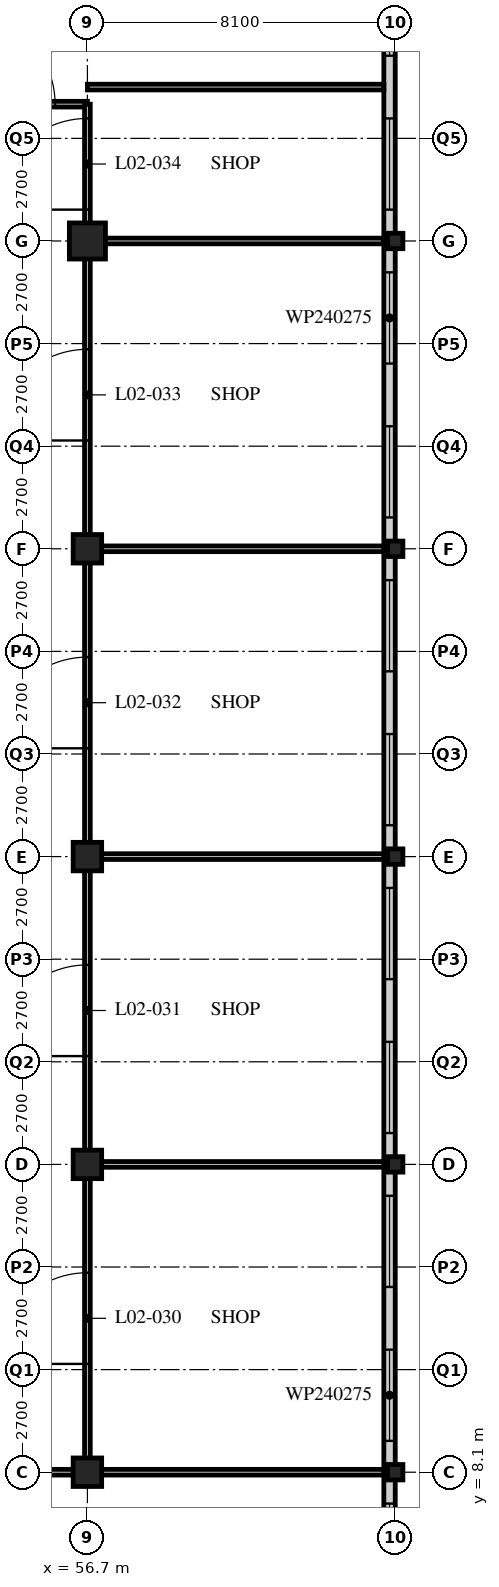
"""IFC4 building model, lengths in metres.
Left out: names, types, materials, properties, quantities, classifications, styles, units other than length and angle.
Written with IfcOpenShell. Run it as: python <this file> out.ifc"""

import sys

from ifc_helpers import new_model, si_unit, direction, frame, frame_2d, origin, origin_2d, place, context, subcontext, project, spatial, rectangle, hollow_rectangle, i_section, extrude, element, fill, save


model = new_model("IFC4")
c1 = context("Model", 3, precision=1e-05, world=origin(), true_north=direction((0.0, 1.0)))
c2 = subcontext(c1, "Body", "Model", "MODEL_VIEW")
j1 = project(units=[si_unit("LENGTHUNIT", "METRE"), si_unit("PLANEANGLEUNIT", "RADIAN")], contexts=[c1])
p1 = place(None, origin())
s1 = spatial("IfcSite", under=j1, at=p1, CompositionType="ELEMENT")
p2 = place(p1, origin())
s2 = spatial("IfcBuilding", under=s1, at=p2, CompositionType="ELEMENT")
p3 = place(p2, frame((0.0, 0.0, 11.4)))
s3 = spatial("IfcBuildingStorey", under=s2, at=p3, CompositionType="ELEMENT", Elevation=11.4)
for number, where, z_axis, x_axis in (
    (1, (56.7, 8.1, 0.0), (0.0, 0.0, 1.0), (1.0, 0.0, 0.0)),
    (2, (56.7, 16.2, 0.0), (0.0, 0.0, 1.0), (1.0, 0.0, 0.0)),
    (3, (56.7, 24.3, 0.0), (0.0, 0.0, 1.0), (1.0, 0.0, 0.0)),
    (4, (56.7, 32.4, 0.0), (0.0, 0.0, 1.0), (1.0, 0.0, 0.0)),
):
    element("IfcColumn", number, at=place(p3, frame(where, z_axis=z_axis, x_axis=x_axis)), inside=s3, PredefinedType="COLUMN", context=c2, shape_type="SweptSolid", body=[
        extrude(hollow_rectangle(XDim=0.75, YDim=0.75, WallThickness=0.07, at=origin_2d()), origin(), (0.0, 0.0, 1.0), 5.4),
    ])
p4 = place(p3, frame((56.7, 40.5, 0.0), z_axis=(0.0, 0.0, 1.0), x_axis=(1.0, 0.0, 0.0)))
e5 = element("IfcColumn", 5, at=p4, inside=s3, PredefinedType="COLUMN", context=c2, shape_type="SweptSolid", body=[
    extrude(hollow_rectangle(XDim=0.95, YDim=0.95, WallThickness=0.1, at=origin_2d()), origin(), (0.0, 0.0, 1.0), 5.4),
])
for number, where, z_axis, x_axis in (
    (6, (64.8, 8.1, 0.0), (0.0, 0.0, 1.0), (1.0, 0.0, 0.0)),
    (7, (64.8, 16.2, 0.0), (0.0, 0.0, 1.0), (1.0, 0.0, 0.0)),
    (8, (64.8, 24.3, 0.0), (0.0, 0.0, 1.0), (1.0, 0.0, 0.0)),
    (9, (64.8, 32.4, 0.0), (0.0, 0.0, 1.0), (1.0, 0.0, 0.0)),
    (10, (64.8, 40.5, 0.0), (0.0, 0.0, 1.0), (1.0, 0.0, 0.0)),
):
    element("IfcColumn", number, at=place(p3, frame(where, z_axis=z_axis, x_axis=x_axis)), inside=s3, PredefinedType="COLUMN", context=c2, shape_type="SweptSolid", body=[
        extrude(i_section(OverallWidth=0.403, OverallDepth=0.406, WebThickness=0.027, FlangeThickness=0.043, FilletRadius=0.015, at=origin_2d()), origin(), (0.0, 0.0, 1.0), 5.4),
    ])
p5 = place(p3, frame((64.65, 0.24, 0.0), z_axis=(0.0, 0.0, 1.0), x_axis=(0.0, 1.0, 0.0)))
e11 = element("IfcWall", 11, at=p5, inside=s3, PredefinedType="SOLIDWALL", context=c2, shape_type="SweptSolid", body=[
    extrude(rectangle(XDim=48.36, YDim=0.3, at=frame_2d((24.18, 0.0))), origin(), (0.0, 0.0, 1.0), 5.15),
])
p6 = place(p5, frame((0.585, 0.0, 1.0)))
e12 = element("IfcOpeningElement", 12, at=p6, cuts=e11, PredefinedType="OPENING", context=c2, shape_type="SweptSolid", body=[
    extrude(rectangle(XDim=2.4, YDim=2.75, at=frame_2d((1.2, 1.375))), frame((0.0, 0.16, 0.0), z_axis=(0.0, -1.0, 0.0), x_axis=(1.0, 0.0, 0.0)), (0.0, 0.0, 1.0), 0.32),
])
p7 = place(p5, frame((4.635, 0.0, 1.0)))
e13 = element("IfcOpeningElement", 13, at=p7, cuts=e11, PredefinedType="OPENING", context=c2, shape_type="SweptSolid", body=[
    extrude(rectangle(XDim=2.4, YDim=2.75, at=frame_2d((1.2, 1.375))), frame((0.0, 0.16, 0.0), z_axis=(0.0, -1.0, 0.0), x_axis=(1.0, 0.0, 0.0)), (0.0, 0.0, 1.0), 0.32),
])
p8 = place(p5, frame((8.685, 0.0, 1.0)))
e14 = element("IfcOpeningElement", 14, at=p8, cuts=e11, PredefinedType="OPENING", context=c2, shape_type="SweptSolid", body=[
    extrude(rectangle(XDim=2.4, YDim=2.75, at=frame_2d((1.2, 1.375))), frame((0.0, 0.16, 0.0), z_axis=(0.0, -1.0, 0.0), x_axis=(1.0, 0.0, 0.0)), (0.0, 0.0, 1.0), 0.32),
])
p9 = place(p5, frame((12.735, 0.0, 1.0)))
e15 = element("IfcOpeningElement", 15, at=p9, cuts=e11, PredefinedType="OPENING", context=c2, shape_type="SweptSolid", body=[
    extrude(rectangle(XDim=2.4, YDim=2.75, at=frame_2d((1.2, 1.375))), frame((0.0, 0.16, 0.0), z_axis=(0.0, -1.0, 0.0), x_axis=(1.0, 0.0, 0.0)), (0.0, 0.0, 1.0), 0.32),
])
p10 = place(p5, frame((16.785, 0.0, 1.0)))
e16 = element("IfcOpeningElement", 16, at=p10, cuts=e11, PredefinedType="OPENING", context=c2, shape_type="SweptSolid", body=[
    extrude(rectangle(XDim=2.4, YDim=2.75, at=frame_2d((1.2, 1.375))), frame((0.0, 0.16, 0.0), z_axis=(0.0, -1.0, 0.0), x_axis=(1.0, 0.0, 0.0)), (0.0, 0.0, 1.0), 0.32),
])
p11 = place(p5, frame((20.835, 0.0, 1.0)))
e17 = element("IfcOpeningElement", 17, at=p11, cuts=e11, PredefinedType="OPENING", context=c2, shape_type="SweptSolid", body=[
    extrude(rectangle(XDim=2.4, YDim=2.75, at=frame_2d((1.2, 1.375))), frame((0.0, 0.16, 0.0), z_axis=(0.0, -1.0, 0.0), x_axis=(1.0, 0.0, 0.0)), (0.0, 0.0, 1.0), 0.32),
])
p12 = place(p5, frame((24.885, 0.0, 1.0)))
e18 = element("IfcOpeningElement", 18, at=p12, cuts=e11, PredefinedType="OPENING", context=c2, shape_type="SweptSolid", body=[
    extrude(rectangle(XDim=2.4, YDim=2.75, at=frame_2d((1.2, 1.375))), frame((0.0, 0.16, 0.0), z_axis=(0.0, -1.0, 0.0), x_axis=(1.0, 0.0, 0.0)), (0.0, 0.0, 1.0), 0.32),
])
p13 = place(p5, frame((28.935, 0.0, 1.0)))
e19 = element("IfcOpeningElement", 19, at=p13, cuts=e11, PredefinedType="OPENING", context=c2, shape_type="SweptSolid", body=[
    extrude(rectangle(XDim=2.4, YDim=2.75, at=frame_2d((1.2, 1.375))), frame((0.0, 0.16, 0.0), z_axis=(0.0, -1.0, 0.0), x_axis=(1.0, 0.0, 0.0)), (0.0, 0.0, 1.0), 0.32),
])
p14 = place(p5, frame((32.985, 0.0, 1.0)))
e20 = element("IfcOpeningElement", 20, at=p14, cuts=e11, PredefinedType="OPENING", context=c2, shape_type="SweptSolid", body=[
    extrude(rectangle(XDim=2.4, YDim=2.75, at=frame_2d((1.2, 1.375))), frame((0.0, 0.16, 0.0), z_axis=(0.0, -1.0, 0.0), x_axis=(1.0, 0.0, 0.0)), (0.0, 0.0, 1.0), 0.32),
])
p15 = place(p5, frame((37.035, 0.0, 1.0)))
e21 = element("IfcOpeningElement", 21, at=p15, cuts=e11, PredefinedType="OPENING", context=c2, shape_type="SweptSolid", body=[
    extrude(rectangle(XDim=2.4, YDim=2.75, at=frame_2d((1.2, 1.375))), frame((0.0, 0.16, 0.0), z_axis=(0.0, -1.0, 0.0), x_axis=(1.0, 0.0, 0.0)), (0.0, 0.0, 1.0), 0.32),
])
p16 = place(p5, frame((41.085, 0.0, 1.0)))
e22 = element("IfcOpeningElement", 22, at=p16, cuts=e11, PredefinedType="OPENING", context=c2, shape_type="SweptSolid", body=[
    extrude(rectangle(XDim=2.4, YDim=2.75, at=frame_2d((1.2, 1.375))), frame((0.0, 0.16, 0.0), z_axis=(0.0, -1.0, 0.0), x_axis=(1.0, 0.0, 0.0)), (0.0, 0.0, 1.0), 0.32),
])
p17 = place(p5, frame((45.135, 0.0, 1.0)))
e23 = element("IfcOpeningElement", 23, at=p17, cuts=e11, PredefinedType="OPENING", context=c2, shape_type="SweptSolid", body=[
    extrude(rectangle(XDim=2.4, YDim=2.75, at=frame_2d((1.2, 1.375))), frame((0.0, 0.16, 0.0), z_axis=(0.0, -1.0, 0.0), x_axis=(1.0, 0.0, 0.0)), (0.0, 0.0, 1.0), 0.32),
])
p18 = place(p3, frame((0.0, 8.1, 0.0), z_axis=(0.0, 0.0, 1.0), x_axis=(1.0, 0.0, 0.0)))
e24 = element("IfcWall", 24, at=p18, inside=s3, PredefinedType="PARTITIONING", context=c2, shape_type="SweptSolid", body=[
    extrude(rectangle(XDim=56.7, YDim=0.15, at=frame_2d((28.35, 0.0))), origin(), (0.0, 0.0, 1.0), 4.538),
])
p19 = place(p18, frame((17.05, 0.0, 0.0)))
e25 = element("IfcOpeningElement", 25, at=p19, cuts=e24, PredefinedType="OPENING", context=c2, shape_type="SweptSolid", body=[
    extrude(rectangle(XDim=1.8, YDim=2.4, at=frame_2d((0.9, 1.2))), frame((0.0, 0.085, 0.0), z_axis=(0.0, -1.0, 0.0), x_axis=(1.0, 0.0, 0.0)), (0.0, 0.0, 1.0), 0.17),
])
p20 = place(p18, frame((27.15, 0.0, 0.0)))
e26 = element("IfcOpeningElement", 26, at=p20, cuts=e24, PredefinedType="OPENING", context=c2, shape_type="SweptSolid", body=[
    extrude(rectangle(XDim=2.4, YDim=2.7, at=frame_2d((1.2, 1.35))), frame((0.0, 0.085, 0.0), z_axis=(0.0, -1.0, 0.0), x_axis=(1.0, 0.0, 0.0)), (0.0, 0.0, 1.0), 0.17),
])
p21 = place(p18, frame((35.25, 0.0, 0.0)))
e27 = element("IfcOpeningElement", 27, at=p21, cuts=e24, PredefinedType="OPENING", context=c2, shape_type="SweptSolid", body=[
    extrude(rectangle(XDim=2.4, YDim=2.7, at=frame_2d((1.2, 1.35))), frame((0.0, 0.085, 0.0), z_axis=(0.0, -1.0, 0.0), x_axis=(1.0, 0.0, 0.0)), (0.0, 0.0, 1.0), 0.17),
])
p22 = place(p18, frame((43.65, 0.0, 0.0)))
e28 = element("IfcOpeningElement", 28, at=p22, cuts=e24, PredefinedType="OPENING", context=c2, shape_type="SweptSolid", body=[
    extrude(rectangle(XDim=1.8, YDim=2.4, at=frame_2d((0.9, 1.2))), frame((0.0, 0.085, 0.0), z_axis=(0.0, -1.0, 0.0), x_axis=(1.0, 0.0, 0.0)), (0.0, 0.0, 1.0), 0.17),
])
p23 = place(p18, frame((2.85, 0.0, 0.0)))
e29 = element("IfcOpeningElement", 29, at=p23, cuts=e24, PredefinedType="OPENING", context=c2, shape_type="SweptSolid", body=[
    extrude(rectangle(XDim=2.4, YDim=2.7, at=frame_2d((1.2, 1.35))), frame((0.0, 0.085, 0.0), z_axis=(0.0, -1.0, 0.0), x_axis=(1.0, 0.0, 0.0)), (0.0, 0.0, 1.0), 0.17),
])
p24 = place(p18, frame((51.45, 0.0, 0.0)))
e30 = element("IfcOpeningElement", 30, at=p24, cuts=e24, PredefinedType="OPENING", context=c2, shape_type="SweptSolid", body=[
    extrude(rectangle(XDim=2.4, YDim=2.7, at=frame_2d((1.2, 1.35))), frame((0.0, 0.085, 0.0), z_axis=(0.0, -1.0, 0.0), x_axis=(1.0, 0.0, 0.0)), (0.0, 0.0, 1.0), 0.17),
])
p25 = place(p3, frame((0.0, 44.1, 0.0), z_axis=(0.0, 0.0, 1.0), x_axis=(1.0, 0.0, 0.0)))
e31 = element("IfcWall", 31, at=p25, inside=s3, PredefinedType="PARTITIONING", context=c2, shape_type="SweptSolid", body=[
    extrude(rectangle(XDim=56.7, YDim=0.15, at=frame_2d((28.35, 0.0))), origin(), (0.0, 0.0, 1.0), 5.15),
])
p26 = place(p25, frame((10.95, 0.0, 0.0)))
e32 = element("IfcOpeningElement", 32, at=p26, cuts=e31, PredefinedType="OPENING", context=c2, shape_type="SweptSolid", body=[
    extrude(rectangle(XDim=2.4, YDim=2.7, at=frame_2d((1.2, 1.35))), frame((0.0, 0.085, 0.0), z_axis=(0.0, -1.0, 0.0), x_axis=(1.0, 0.0, 0.0)), (0.0, 0.0, 1.0), 0.17),
])
p27 = place(p25, frame((19.05, 0.0, 0.0)))
e33 = element("IfcOpeningElement", 33, at=p27, cuts=e31, PredefinedType="OPENING", context=c2, shape_type="SweptSolid", body=[
    extrude(rectangle(XDim=2.4, YDim=2.7, at=frame_2d((1.2, 1.35))), frame((0.0, 0.085, 0.0), z_axis=(0.0, -1.0, 0.0), x_axis=(1.0, 0.0, 0.0)), (0.0, 0.0, 1.0), 0.17),
])
p28 = place(p25, frame((27.15, 0.0, 0.0)))
e34 = element("IfcOpeningElement", 34, at=p28, cuts=e31, PredefinedType="OPENING", context=c2, shape_type="SweptSolid", body=[
    extrude(rectangle(XDim=2.4, YDim=2.7, at=frame_2d((1.2, 1.35))), frame((0.0, 0.085, 0.0), z_axis=(0.0, -1.0, 0.0), x_axis=(1.0, 0.0, 0.0)), (0.0, 0.0, 1.0), 0.17),
])
p29 = place(p25, frame((35.25, 0.0, 0.0)))
e35 = element("IfcOpeningElement", 35, at=p29, cuts=e31, PredefinedType="OPENING", context=c2, shape_type="SweptSolid", body=[
    extrude(rectangle(XDim=2.4, YDim=2.7, at=frame_2d((1.2, 1.35))), frame((0.0, 0.085, 0.0), z_axis=(0.0, -1.0, 0.0), x_axis=(1.0, 0.0, 0.0)), (0.0, 0.0, 1.0), 0.17),
])
p30 = place(p25, frame((43.35, 0.0, 0.0)))
e36 = element("IfcOpeningElement", 36, at=p30, cuts=e31, PredefinedType="OPENING", context=c2, shape_type="SweptSolid", body=[
    extrude(rectangle(XDim=2.4, YDim=2.7, at=frame_2d((1.2, 1.35))), frame((0.0, 0.085, 0.0), z_axis=(0.0, -1.0, 0.0), x_axis=(1.0, 0.0, 0.0)), (0.0, 0.0, 1.0), 0.17),
])
p31 = place(p25, frame((53.45, 0.0, 0.0)))
e37 = element("IfcOpeningElement", 37, at=p31, cuts=e31, PredefinedType="OPENING", context=c2, shape_type="SweptSolid", body=[
    extrude(rectangle(XDim=2.4, YDim=2.7, at=frame_2d((1.2, 1.35))), frame((0.0, 0.085, 0.0), z_axis=(0.0, -1.0, 0.0), x_axis=(1.0, 0.0, 0.0)), (0.0, 0.0, 1.0), 0.17),
])
p32 = place(p25, frame((4.85, 0.0, 0.0)))
e38 = element("IfcOpeningElement", 38, at=p32, cuts=e31, PredefinedType="OPENING", context=c2, shape_type="SweptSolid", body=[
    extrude(rectangle(XDim=2.4, YDim=2.7, at=frame_2d((1.2, 1.35))), frame((0.0, 0.085, 0.0), z_axis=(0.0, -1.0, 0.0), x_axis=(1.0, 0.0, 0.0)), (0.0, 0.0, 1.0), 0.17),
])
p33 = place(p3, frame((56.7, 8.1, 0.0), z_axis=(0.0, 0.0, 1.0), x_axis=(0.0, 1.0, 0.0)))
e39 = element("IfcWall", 39, at=p33, inside=s3, PredefinedType="PARTITIONING", context=c2, shape_type="SweptSolid", body=[
    extrude(rectangle(XDim=36.0, YDim=0.15, at=frame_2d((18.0, 0.0))), origin(), (0.0, 0.0, 1.0), 4.538),
])
p34 = place(p33, frame((2.85, 0.0, 0.0)))
e40 = element("IfcOpeningElement", 40, at=p34, cuts=e39, PredefinedType="OPENING", context=c2, shape_type="SweptSolid", body=[
    extrude(rectangle(XDim=2.4, YDim=2.7, at=frame_2d((1.2, 1.35))), frame((0.0, 0.085, 0.0), z_axis=(0.0, -1.0, 0.0), x_axis=(1.0, 0.0, 0.0)), (0.0, 0.0, 1.0), 0.17),
])
p35 = place(p33, frame((10.95, 0.0, 0.0)))
e41 = element("IfcOpeningElement", 41, at=p35, cuts=e39, PredefinedType="OPENING", context=c2, shape_type="SweptSolid", body=[
    extrude(rectangle(XDim=2.4, YDim=2.7, at=frame_2d((1.2, 1.35))), frame((0.0, 0.085, 0.0), z_axis=(0.0, -1.0, 0.0), x_axis=(1.0, 0.0, 0.0)), (0.0, 0.0, 1.0), 0.17),
])
p36 = place(p33, frame((19.05, 0.0, 0.0)))
e42 = element("IfcOpeningElement", 42, at=p36, cuts=e39, PredefinedType="OPENING", context=c2, shape_type="SweptSolid", body=[
    extrude(rectangle(XDim=2.4, YDim=2.7, at=frame_2d((1.2, 1.35))), frame((0.0, 0.085, 0.0), z_axis=(0.0, -1.0, 0.0), x_axis=(1.0, 0.0, 0.0)), (0.0, 0.0, 1.0), 0.17),
])
p37 = place(p33, frame((27.15, 0.0, 0.0)))
e43 = element("IfcOpeningElement", 43, at=p37, cuts=e39, PredefinedType="OPENING", context=c2, shape_type="SweptSolid", body=[
    extrude(rectangle(XDim=2.4, YDim=2.7, at=frame_2d((1.2, 1.35))), frame((0.0, 0.085, 0.0), z_axis=(0.0, -1.0, 0.0), x_axis=(1.0, 0.0, 0.0)), (0.0, 0.0, 1.0), 0.17),
])
p38 = place(p33, frame((33.225, 0.0, 0.0)))
e44 = element("IfcOpeningElement", 44, at=p38, cuts=e39, PredefinedType="OPENING", context=c2, shape_type="SweptSolid", body=[
    extrude(rectangle(XDim=2.4, YDim=2.7, at=frame_2d((1.2, 1.35))), frame((0.0, 0.085, 0.0), z_axis=(0.0, -1.0, 0.0), x_axis=(1.0, 0.0, 0.0)), (0.0, 0.0, 1.0), 0.17),
])
for number, where, z_axis, x_axis in (
    (45, (56.7, 16.2, 0.0), (0.0, 0.0, 1.0), (1.0, 0.0, 0.0)),
    (46, (56.7, 24.3, 0.0), (0.0, 0.0, 1.0), (1.0, 0.0, 0.0)),
    (47, (56.7, 32.4, 0.0), (0.0, 0.0, 1.0), (1.0, 0.0, 0.0)),
    (48, (56.7, 40.5, 0.0), (0.0, 0.0, 1.0), (1.0, 0.0, 0.0)),
    (49, (56.7, 8.1, 0.0), (0.0, 0.0, 1.0), (1.0, 0.0, 0.0)),
):
    element("IfcWall", number, at=place(p3, frame(where, z_axis=z_axis, x_axis=x_axis)), inside=s3, PredefinedType="PARTITIONING", context=c2, shape_type="SweptSolid", body=[
        extrude(rectangle(XDim=7.8, YDim=0.15, at=frame_2d((3.9, 0.0))), origin(), (0.0, 0.0, 1.0), 4.538),
    ])
p39 = place(p3, frame((56.7, 44.55, 0.0), z_axis=(0.0, 0.0, 1.0), x_axis=(1.0, 0.0, 0.0)))
e50 = element("IfcWall", 50, at=p39, inside=s3, PredefinedType="PARTITIONING", context=c2, shape_type="SweptSolid", body=[
    extrude(rectangle(XDim=7.8, YDim=0.15, at=frame_2d((3.9, 0.0))), origin(), (0.0, 0.0, 1.0), 5.15),
])
p40 = place(p7, origin())
e51 = element("IfcWindow", 51, at=p40, inside=s3, PartitioningType="SINGLE_PANEL", PredefinedType="WINDOW", context=c2, shape_type="SweptSolid", body=[
    extrude(rectangle(XDim=2.4, YDim=2.75, at=frame_2d((1.2, 1.375))), frame((0.0, 0.03, 0.0), z_axis=(0.0, -1.0, 0.0), x_axis=(1.0, 0.0, 0.0)), (0.0, 0.0, 1.0), 0.06),
])
fill(e13, e51)
p41 = place(p8, origin())
e52 = element("IfcWindow", 52, at=p41, inside=s3, PartitioningType="SINGLE_PANEL", PredefinedType="WINDOW", context=c2, shape_type="SweptSolid", body=[
    extrude(rectangle(XDim=2.4, YDim=2.75, at=frame_2d((1.2, 1.375))), frame((0.0, 0.03, 0.0), z_axis=(0.0, -1.0, 0.0), x_axis=(1.0, 0.0, 0.0)), (0.0, 0.0, 1.0), 0.06),
])
fill(e14, e52)
p42 = place(p9, origin())
e53 = element("IfcWindow", 53, at=p42, inside=s3, PartitioningType="SINGLE_PANEL", PredefinedType="WINDOW", context=c2, shape_type="SweptSolid", body=[
    extrude(rectangle(XDim=2.4, YDim=2.75, at=frame_2d((1.2, 1.375))), frame((0.0, 0.03, 0.0), z_axis=(0.0, -1.0, 0.0), x_axis=(1.0, 0.0, 0.0)), (0.0, 0.0, 1.0), 0.06),
])
fill(e15, e53)
p43 = place(p10, origin())
e54 = element("IfcWindow", 54, at=p43, inside=s3, PartitioningType="SINGLE_PANEL", PredefinedType="WINDOW", context=c2, shape_type="SweptSolid", body=[
    extrude(rectangle(XDim=2.4, YDim=2.75, at=frame_2d((1.2, 1.375))), frame((0.0, 0.03, 0.0), z_axis=(0.0, -1.0, 0.0), x_axis=(1.0, 0.0, 0.0)), (0.0, 0.0, 1.0), 0.06),
])
fill(e16, e54)
p44 = place(p11, origin())
e55 = element("IfcWindow", 55, at=p44, inside=s3, PartitioningType="SINGLE_PANEL", PredefinedType="WINDOW", context=c2, shape_type="SweptSolid", body=[
    extrude(rectangle(XDim=2.4, YDim=2.75, at=frame_2d((1.2, 1.375))), frame((0.0, 0.03, 0.0), z_axis=(0.0, -1.0, 0.0), x_axis=(1.0, 0.0, 0.0)), (0.0, 0.0, 1.0), 0.06),
])
fill(e17, e55)
p45 = place(p12, origin())
e56 = element("IfcWindow", 56, at=p45, inside=s3, PartitioningType="SINGLE_PANEL", PredefinedType="WINDOW", context=c2, shape_type="SweptSolid", body=[
    extrude(rectangle(XDim=2.4, YDim=2.75, at=frame_2d((1.2, 1.375))), frame((0.0, 0.03, 0.0), z_axis=(0.0, -1.0, 0.0), x_axis=(1.0, 0.0, 0.0)), (0.0, 0.0, 1.0), 0.06),
])
fill(e18, e56)
p46 = place(p13, origin())
e57 = element("IfcWindow", 57, at=p46, inside=s3, PartitioningType="SINGLE_PANEL", PredefinedType="WINDOW", context=c2, shape_type="SweptSolid", body=[
    extrude(rectangle(XDim=2.4, YDim=2.75, at=frame_2d((1.2, 1.375))), frame((0.0, 0.03, 0.0), z_axis=(0.0, -1.0, 0.0), x_axis=(1.0, 0.0, 0.0)), (0.0, 0.0, 1.0), 0.06),
])
fill(e19, e57)
p47 = place(p14, origin())
e58 = element("IfcWindow", 58, at=p47, inside=s3, PartitioningType="SINGLE_PANEL", PredefinedType="WINDOW", context=c2, shape_type="SweptSolid", body=[
    extrude(rectangle(XDim=2.4, YDim=2.75, at=frame_2d((1.2, 1.375))), frame((0.0, 0.03, 0.0), z_axis=(0.0, -1.0, 0.0), x_axis=(1.0, 0.0, 0.0)), (0.0, 0.0, 1.0), 0.06),
])
fill(e20, e58)
p48 = place(p15, origin())
e59 = element("IfcWindow", 59, at=p48, inside=s3, PartitioningType="SINGLE_PANEL", PredefinedType="WINDOW", context=c2, shape_type="SweptSolid", body=[
    extrude(rectangle(XDim=2.4, YDim=2.75, at=frame_2d((1.2, 1.375))), frame((0.0, 0.03, 0.0), z_axis=(0.0, -1.0, 0.0), x_axis=(1.0, 0.0, 0.0)), (0.0, 0.0, 1.0), 0.06),
])
fill(e21, e59)
p49 = place(p16, origin())
e60 = element("IfcWindow", 60, at=p49, inside=s3, PartitioningType="SINGLE_PANEL", PredefinedType="WINDOW", context=c2, shape_type="SweptSolid", body=[
    extrude(rectangle(XDim=2.4, YDim=2.75, at=frame_2d((1.2, 1.375))), frame((0.0, 0.03, 0.0), z_axis=(0.0, -1.0, 0.0), x_axis=(1.0, 0.0, 0.0)), (0.0, 0.0, 1.0), 0.06),
])
fill(e22, e60)
p50 = place(p17, origin())
e61 = element("IfcWindow", 61, at=p50, inside=s3, PartitioningType="SINGLE_PANEL", PredefinedType="WINDOW", context=c2, shape_type="SweptSolid", body=[
    extrude(rectangle(XDim=2.4, YDim=2.75, at=frame_2d((1.2, 1.375))), frame((0.0, 0.03, 0.0), z_axis=(0.0, -1.0, 0.0), x_axis=(1.0, 0.0, 0.0)), (0.0, 0.0, 1.0), 0.06),
])
fill(e23, e61)
p51 = place(p34, origin())
e62 = element("IfcDoor", 62, at=p51, inside=s3, OperationType="DOUBLE_DOOR_SINGLE_SWING", PredefinedType="DOOR", context=c2, shape_type="SweptSolid", body=[
    extrude(rectangle(XDim=2.4, YDim=2.7, at=frame_2d((1.2, 1.35))), frame((0.0, 0.025, 0.0), z_axis=(0.0, -1.0, 0.0), x_axis=(1.0, 0.0, 0.0)), (0.0, 0.0, 1.0), 0.05),
])
fill(e40, e62)
p52 = place(p35, origin())
e63 = element("IfcDoor", 63, at=p52, inside=s3, OperationType="DOUBLE_DOOR_SINGLE_SWING", PredefinedType="DOOR", context=c2, shape_type="SweptSolid", body=[
    extrude(rectangle(XDim=2.4, YDim=2.7, at=frame_2d((1.2, 1.35))), frame((0.0, 0.025, 0.0), z_axis=(0.0, -1.0, 0.0), x_axis=(1.0, 0.0, 0.0)), (0.0, 0.0, 1.0), 0.05),
])
fill(e41, e63)
p53 = place(p36, origin())
e64 = element("IfcDoor", 64, at=p53, inside=s3, OperationType="DOUBLE_DOOR_SINGLE_SWING", PredefinedType="DOOR", context=c2, shape_type="SweptSolid", body=[
    extrude(rectangle(XDim=2.4, YDim=2.7, at=frame_2d((1.2, 1.35))), frame((0.0, 0.025, 0.0), z_axis=(0.0, -1.0, 0.0), x_axis=(1.0, 0.0, 0.0)), (0.0, 0.0, 1.0), 0.05),
])
fill(e42, e64)
p54 = place(p37, origin())
e65 = element("IfcDoor", 65, at=p54, inside=s3, OperationType="DOUBLE_DOOR_SINGLE_SWING", PredefinedType="DOOR", context=c2, shape_type="SweptSolid", body=[
    extrude(rectangle(XDim=2.4, YDim=2.7, at=frame_2d((1.2, 1.35))), frame((0.0, 0.025, 0.0), z_axis=(0.0, -1.0, 0.0), x_axis=(1.0, 0.0, 0.0)), (0.0, 0.0, 1.0), 0.05),
])
fill(e43, e65)
p55 = place(p38, origin())
e66 = element("IfcDoor", 66, at=p55, inside=s3, OperationType="DOUBLE_DOOR_SINGLE_SWING", PredefinedType="DOOR", context=c2, shape_type="SweptSolid", body=[
    extrude(rectangle(XDim=2.4, YDim=2.7, at=frame_2d((1.2, 1.35))), frame((0.0, 0.025, 0.0), z_axis=(0.0, -1.0, 0.0), x_axis=(1.0, 0.0, 0.0)), (0.0, 0.0, 1.0), 0.05),
])
fill(e44, e66)
p56 = place(p31, origin())
e67 = element("IfcDoor", 67, at=p56, inside=s3, OperationType="DOUBLE_DOOR_SINGLE_SWING", PredefinedType="DOOR", context=c2, shape_type="SweptSolid", body=[
    extrude(rectangle(XDim=2.4, YDim=2.7, at=frame_2d((1.2, 1.35))), frame((0.0, 0.025, 0.0), z_axis=(0.0, -1.0, 0.0), x_axis=(1.0, 0.0, 0.0)), (0.0, 0.0, 1.0), 0.05),
])
fill(e37, e67)
save(model, sys.argv[1])
